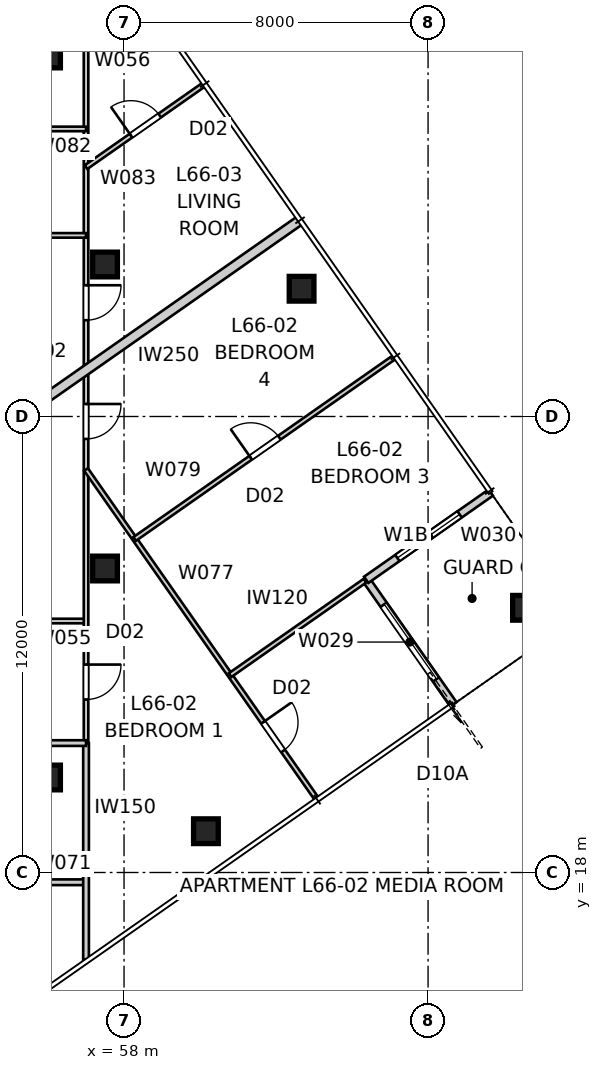
"""IFC4 building model, lengths in metres.
Left out: names, types, materials, properties, quantities, classifications, styles, units other than length and angle.
Written with IfcOpenShell. Run it as: python <this file> out.ifc"""

import sys

from ifc_helpers import new_model, si_unit, direction, frame, frame_2d, origin, origin_2d, place, context, subcontext, project, spatial, rectangle, extrude, element, fill, save


model = new_model("IFC4")
c1 = context("Model", 3, precision=1e-05, world=origin(), true_north=direction((0.0, 1.0)))
c2 = subcontext(c1, "Body", "Model", "MODEL_VIEW")
j1 = project(units=[si_unit("LENGTHUNIT", "METRE"), si_unit("PLANEANGLEUNIT", "RADIAN")], contexts=[c1])
p1 = place(None, origin())
s1 = spatial("IfcSite", under=j1, at=p1, CompositionType="ELEMENT")
p2 = place(p1, origin())
s2 = spatial("IfcBuilding", under=s1, at=p2, CompositionType="ELEMENT")
p3 = place(p2, frame((0.0, 0.0, 240.4)))
s3 = spatial("IfcBuildingStorey", under=s2, at=p3, CompositionType="ELEMENT", Elevation=240.4)
for number, where, z_axis, x_axis in (
    (1, (60.155, 19.086, -0.15), (0.0, 0.0, 1.0), (1.0, 0.0, 0.0)),
    (2, (68.551, 24.966, -0.15), (0.0, 0.0, 1.0), (1.0, 0.0, 0.0)),
    (3, (62.672, 33.362, -0.15), (0.0, 0.0, 1.0), (1.0, 0.0, 0.0)),
):
    element("IfcColumn", number, at=place(p3, frame(where, z_axis=z_axis, x_axis=x_axis)), inside=s3, PredefinedType="COLUMN", context=c2, shape_type="SweptSolid", body=[
        extrude(rectangle(XDim=0.65, YDim=0.65, at=origin_2d()), origin(), (0.0, 0.0, 1.0), 3.55),
    ])
for number, where, z_axis, x_axis in (
    (4, (57.5, 26.0, 0.0), (0.0, 0.0, 1.0), (1.0, 0.0, 0.0)),
    (5, (57.5, 34.0, 0.0), (0.0, 0.0, 1.0), (1.0, 0.0, 0.0)),
    (6, (56.0, 39.5, 0.0), (0.0, 0.0, 1.0), (1.0, 0.0, 0.0)),
    (7, (56.0, 20.5, 0.0), (0.0, 0.0, 1.0), (1.0, 0.0, 0.0)),
):
    element("IfcColumn", number, at=place(p3, frame(where, z_axis=z_axis, x_axis=x_axis)), inside=s3, PredefinedType="COLUMN", context=c2, shape_type="SweptSolid", body=[
        extrude(rectangle(XDim=0.65, YDim=0.65, at=origin_2d()), origin(), (0.0, 0.0, 1.0), 3.4),
    ])
p4 = place(p3, frame((66.667, 22.426, 0.0), z_axis=(0.0, 0.0, 1.0), x_axis=(-0.573556557423, 0.819165963305, 0.0)))
e8 = element("IfcWall", 8, at=p4, inside=s3, PredefinedType="SOLIDWALL", context=c2, shape_type="SweptSolid", body=[
    extrude(rectangle(XDim=4.0, YDim=0.2, at=frame_2d((2.0, 0.0))), origin(), (0.0, 0.0, 1.0), 3.25),
])
p5 = place(p4, frame((0.8, 0.0, 0.0)))
e9 = element("IfcOpeningElement", 9, at=p5, cuts=e8, PredefinedType="OPENING", context=c2, shape_type="SweptSolid", body=[
    extrude(rectangle(XDim=2.4, YDim=2.1, at=frame_2d((1.2, 1.05))), frame((0.0, 0.11, 0.0), z_axis=(0.0, -1.0, 0.0), x_axis=(1.0, 0.0, 0.0)), (0.0, 0.0, 1.0), 0.22),
])
p6 = place(p3, frame((64.373, 25.702, 0.0), z_axis=(0.0, 0.0, 1.0), x_axis=(0.819137286189, 0.573597512525, 0.0)))
e10 = element("IfcWall", 10, at=p6, inside=s3, PredefinedType="SOLIDWALL", context=c2, shape_type="SweptSolid", body=[
    extrude(rectangle(XDim=4.0, YDim=0.2, at=frame_2d((2.0, 0.0))), origin(), (0.0, 0.0, 1.0), 3.25),
])
p7 = place(p6, frame((1.0, 0.0, 0.45)))
e11 = element("IfcOpeningElement", 11, at=p7, cuts=e10, PredefinedType="OPENING", context=c2, shape_type="SweptSolid", body=[
    extrude(rectangle(XDim=2.0, YDim=1.8, at=frame_2d((1.0, 0.9))), frame((0.0, 0.11, 0.0), z_axis=(0.0, -1.0, 0.0), x_axis=(1.0, 0.0, 0.0)), (0.0, 0.0, 1.0), 0.22),
])
p8 = place(p3, frame((57.612, 42.332, 0.0), z_axis=(0.0, 0.0, 1.0), x_axis=(-0.819161528122, -0.573562891796, 0.0)))
e12 = element("IfcWall", 12, at=p8, inside=s3, PredefinedType="PARTITIONING", context=c2, shape_type="SweptSolid", body=[
    extrude(rectangle(XDim=6.681, YDim=0.25, at=frame_2d((3.341, 0.0))), origin(), (0.0, 0.0, 1.0), 3.25),
])
p9 = place(p3, frame((62.631, 35.164, 0.0), z_axis=(0.0, 0.0, 1.0), x_axis=(-0.81915902312, -0.573566469418, 0.0)))
e13 = element("IfcWall", 13, at=p9, inside=s3, PredefinedType="PARTITIONING", context=c2, shape_type="SweptSolid", body=[
    extrude(rectangle(XDim=9.756, YDim=0.25, at=frame_2d((4.878, 0.0))), origin(), (0.0, 0.0, 1.0), 3.25),
])
p10 = place(p3, frame((57.0, 24.618, 0.0), z_axis=(0.0, 0.0, 1.0), x_axis=(-1.0, 0.0, 0.0)))
e14 = element("IfcWall", 14, at=p10, inside=s3, PredefinedType="PARTITIONING", context=c2, shape_type="SweptSolid", body=[
    extrude(rectangle(XDim=4.9, YDim=0.12, at=frame_2d((2.45, 0.0))), origin(), (0.0, 0.0, 1.0), 3.25),
])
p11 = place(p10, frame((1.99, 0.0, 0.0)))
e15 = element("IfcOpeningElement", 15, at=p11, cuts=e14, PredefinedType="OPENING", context=c2, shape_type="SweptSolid", body=[
    extrude(rectangle(XDim=0.92, YDim=2.34, at=frame_2d((0.46, 1.17))), frame((0.0, 0.07, 0.0), z_axis=(0.0, -1.0, 0.0), x_axis=(1.0, 0.0, 0.0)), (0.0, 0.0, 1.0), 0.14),
])
p12 = place(p3, frame((57.0, 41.904, 0.0), z_axis=(0.0, 0.0, 1.0), x_axis=(0.0, -1.0, 0.0)))
e16 = element("IfcWall", 16, at=p12, inside=s3, PredefinedType="PARTITIONING", context=c2, shape_type="SweptSolid", body=[
    extrude(rectangle(XDim=20.498, YDim=0.12, at=frame_2d((10.249, 0.0))), origin(), (0.0, 0.0, 1.0), 2.55),
])
p13 = place(p12, frame((8.449, 0.0, 0.0)))
e17 = element("IfcOpeningElement", 17, at=p13, cuts=e16, PredefinedType="OPENING", context=c2, shape_type="SweptSolid", body=[
    extrude(rectangle(XDim=0.92, YDim=2.34, at=frame_2d((0.46, 1.17))), frame((0.0, 0.07, 0.0), z_axis=(0.0, -1.0, 0.0), x_axis=(1.0, 0.0, 0.0)), (0.0, 0.0, 1.0), 0.14),
])
p14 = place(p12, frame((11.574, 0.0, 0.0)))
e18 = element("IfcOpeningElement", 18, at=p14, cuts=e16, PredefinedType="OPENING", context=c2, shape_type="SweptSolid", body=[
    extrude(rectangle(XDim=0.92, YDim=2.34, at=frame_2d((0.46, 1.17))), frame((0.0, 0.07, 0.0), z_axis=(0.0, -1.0, 0.0), x_axis=(1.0, 0.0, 0.0)), (0.0, 0.0, 1.0), 0.14),
])
p15 = place(p12, frame((18.432, 0.0, 0.0)))
e19 = element("IfcOpeningElement", 19, at=p15, cuts=e16, PredefinedType="OPENING", context=c2, shape_type="SweptSolid", body=[
    extrude(rectangle(XDim=0.92, YDim=2.34, at=frame_2d((0.46, 1.17))), frame((0.0, 0.07, 0.0), z_axis=(0.0, -1.0, 0.0), x_axis=(1.0, 0.0, 0.0)), (0.0, 0.0, 1.0), 0.14),
])
p16 = place(p3, frame((52.109, 17.743, 0.0), z_axis=(0.0, 0.0, 1.0), x_axis=(1.0, 0.0, 0.0)))
e20 = element("IfcWall", 20, at=p16, inside=s3, PredefinedType="SOLIDWALL", context=c2, shape_type="SweptSolid", body=[
    extrude(rectangle(XDim=4.891, YDim=0.15, at=frame_2d((2.446, 0.0))), origin(), (0.0, 0.0, 1.0), 3.25),
])
p17 = place(p16, frame((1.986, 0.0, 0.0)))
e21 = element("IfcOpeningElement", 21, at=p17, cuts=e20, PredefinedType="OPENING", context=c2, shape_type="SweptSolid", body=[
    extrude(rectangle(XDim=0.92, YDim=2.34, at=frame_2d((0.46, 1.17))), frame((0.0, 0.085, 0.0), z_axis=(0.0, -1.0, 0.0), x_axis=(1.0, 0.0, 0.0)), (0.0, 0.0, 1.0), 0.17),
])
p18 = place(p3, frame((57.0, 21.406, 0.0), z_axis=(0.0, 0.0, 1.0), x_axis=(0.0, -1.0, 0.0)))
e22 = element("IfcWall", 22, at=p18, inside=s3, PredefinedType="SOLIDWALL", context=c2, shape_type="SweptSolid", body=[
    extrude(rectangle(XDim=5.7, YDim=0.15, at=frame_2d((2.85, 0.0))), origin(), (0.0, 0.0, 1.0), 3.25),
])
p19 = place(p3, frame((57.0, 21.406, 0.0), z_axis=(0.0, 0.0, 1.0), x_axis=(-1.0, 0.0, 0.0)))
e23 = element("IfcWall", 23, at=p19, inside=s3, PredefinedType="SOLIDWALL", context=c2, shape_type="SweptSolid", body=[
    extrude(rectangle(XDim=4.9, YDim=0.15, at=frame_2d((2.45, 0.0))), origin(), (0.0, 0.0, 1.0), 3.25),
])
p20 = place(p19, frame((1.99, 0.0, 0.0)))
e24 = element("IfcOpeningElement", 24, at=p20, cuts=e23, PredefinedType="OPENING", context=c2, shape_type="SweptSolid", body=[
    extrude(rectangle(XDim=0.92, YDim=2.34, at=frame_2d((0.46, 1.17))), frame((0.0, 0.085, 0.0), z_axis=(0.0, -1.0, 0.0), x_axis=(1.0, 0.0, 0.0)), (0.0, 0.0, 1.0), 0.17),
])
p21 = place(p3, frame((57.0, 28.604, 0.0), z_axis=(0.0, 0.0, 1.0), x_axis=(0.573575545802, -0.819152667857, 0.0)))
e25 = element("IfcWall", 25, at=p21, inside=s3, PredefinedType="PARTITIONING", context=c2, shape_type="SweptSolid", body=[
    extrude(rectangle(XDim=10.566, YDim=0.12, at=frame_2d((5.283, 0.0))), origin(), (0.0, 0.0, 1.0), 3.25),
])
p22 = place(p21, frame((8.121, 0.0, 0.0)))
e26 = element("IfcOpeningElement", 26, at=p22, cuts=e25, PredefinedType="OPENING", context=c2, shape_type="SweptSolid", body=[
    extrude(rectangle(XDim=0.92, YDim=2.34, at=frame_2d((0.46, 1.17))), frame((0.0, 0.07, 0.0), z_axis=(0.0, -1.0, 0.0), x_axis=(1.0, 0.0, 0.0)), (0.0, 0.0, 1.0), 0.14),
])
p23 = place(p3, frame((58.28, 26.777, 0.0), z_axis=(0.0, 0.0, 1.0), x_axis=(0.819152099525, 0.573576357466, 0.0)))
e27 = element("IfcWall", 27, at=p23, inside=s3, PredefinedType="PARTITIONING", context=c2, shape_type="SweptSolid", body=[
    extrude(rectangle(XDim=8.335, YDim=0.12, at=frame_2d((4.167, 0.0))), origin(), (0.0, 0.0, 1.0), 3.25),
])
p24 = place(p23, frame((3.728, 0.0, 0.0)))
e28 = element("IfcOpeningElement", 28, at=p24, cuts=e27, PredefinedType="OPENING", context=c2, shape_type="SweptSolid", body=[
    extrude(rectangle(XDim=0.92, YDim=2.34, at=frame_2d((0.46, 1.17))), frame((0.0, 0.07, 0.0), z_axis=(0.0, -1.0, 0.0), x_axis=(1.0, 0.0, 0.0)), (0.0, 0.0, 1.0), 0.14),
])
p25 = place(p3, frame((64.34, 25.679, 0.0), z_axis=(0.0, 0.0, 1.0), x_axis=(-0.819165768115, -0.573556836197, 0.0)))
e29 = element("IfcWall", 29, at=p25, inside=s3, PredefinedType="PARTITIONING", context=c2, shape_type="SweptSolid", body=[
    extrude(rectangle(XDim=4.335, YDim=0.12, at=frame_2d((2.167, 0.0))), origin(), (0.0, 0.0, 1.0), 3.25),
])
p26 = place(p3, frame((52.1, 34.766, 0.0), z_axis=(0.0, 0.0, 1.0), x_axis=(1.0, 0.0, 0.0)))
e30 = element("IfcWall", 30, at=p26, inside=s3, PredefinedType="PARTITIONING", context=c2, shape_type="SweptSolid", body=[
    extrude(rectangle(XDim=4.9, YDim=0.12, at=frame_2d((2.45, 0.0))), origin(), (0.0, 0.0, 1.0), 3.25),
])
p27 = place(p26, frame((2.59, 0.0, 0.0)))
e31 = element("IfcOpeningElement", 31, at=p27, cuts=e30, PredefinedType="OPENING", context=c2, shape_type="SweptSolid", body=[
    extrude(rectangle(XDim=0.92, YDim=2.34, at=frame_2d((0.46, 1.17))), frame((0.0, 0.07, 0.0), z_axis=(0.0, -1.0, 0.0), x_axis=(1.0, 0.0, 0.0)), (0.0, 0.0, 1.0), 0.14),
])
p28 = place(p3, frame((57.0, 37.568, 0.0), z_axis=(0.0, 0.0, 1.0), x_axis=(-1.0, 0.0, 0.0)))
e32 = element("IfcWall", 32, at=p28, inside=s3, PredefinedType="PARTITIONING", context=c2, shape_type="SweptSolid", body=[
    extrude(rectangle(XDim=4.9, YDim=0.12, at=frame_2d((2.45, 0.0))), origin(), (0.0, 0.0, 1.0), 3.25),
])
p29 = place(p28, frame((1.97, 0.0, 0.0)))
e33 = element("IfcOpeningElement", 33, at=p29, cuts=e32, PredefinedType="OPENING", context=c2, shape_type="SweptSolid", body=[
    extrude(rectangle(XDim=0.96, YDim=2.1, at=frame_2d((0.48, 1.05))), frame((0.0, 0.07, 0.0), z_axis=(0.0, -1.0, 0.0), x_axis=(1.0, 0.0, 0.0)), (0.0, 0.0, 1.0), 0.14),
])
p30 = place(p3, frame((57.0, 36.562, 0.0), z_axis=(0.0, 0.0, 1.0), x_axis=(0.819140645834, 0.573592714688, 0.0)))
e34 = element("IfcWall", 34, at=p30, inside=s3, PredefinedType="PARTITIONING", context=c2, shape_type="SweptSolid", body=[
    extrude(rectangle(XDim=3.77, YDim=0.12, at=frame_2d((1.885, 0.0))), origin(), (0.0, 0.0, 1.0), 3.25),
])
p31 = place(p30, frame((1.445, 0.0, 0.0)))
e35 = element("IfcOpeningElement", 35, at=p31, cuts=e34, PredefinedType="OPENING", context=c2, shape_type="SweptSolid", body=[
    extrude(rectangle(XDim=0.92, YDim=2.34, at=frame_2d((0.46, 1.17))), frame((0.0, 0.07, 0.0), z_axis=(0.0, -1.0, 0.0), x_axis=(1.0, 0.0, 0.0)), (0.0, 0.0, 1.0), 0.14),
])
p32 = place(p5, origin())
e36 = element("IfcDoor", 36, at=p32, inside=s3, OperationType="SLIDING_TO_LEFT", PredefinedType="DOOR", context=c2, shape_type="SweptSolid", body=[
    extrude(rectangle(XDim=2.4, YDim=2.1, at=frame_2d((1.2, 1.05))), frame((0.0, 0.025, 0.0), z_axis=(0.0, -1.0, 0.0), x_axis=(1.0, 0.0, 0.0)), (0.0, 0.0, 1.0), 0.05),
])
fill(e9, e36)
p33 = place(p7, origin())
e37 = element("IfcWindow", 37, at=p33, inside=s3, PartitioningType="SINGLE_PANEL", PredefinedType="WINDOW", context=c2, shape_type="SweptSolid", body=[
    extrude(rectangle(XDim=2.0, YDim=1.8, at=frame_2d((1.0, 0.9))), frame((0.0, 0.03, 0.0), z_axis=(0.0, -1.0, 0.0), x_axis=(1.0, 0.0, 0.0)), (0.0, 0.0, 1.0), 0.06),
])
fill(e11, e37)
p34 = place(p13, origin())
e38 = element("IfcDoor", 38, at=p34, inside=s3, OperationType="SINGLE_SWING_LEFT", PredefinedType="DOOR", context=c2, shape_type="SweptSolid", body=[
    extrude(rectangle(XDim=0.92, YDim=2.34, at=frame_2d((0.46, 1.17))), frame((0.0, 0.025, 0.0), z_axis=(0.0, -1.0, 0.0), x_axis=(1.0, 0.0, 0.0)), (0.0, 0.0, 1.0), 0.05),
])
fill(e17, e38)
p35 = place(p14, origin())
e39 = element("IfcDoor", 39, at=p35, inside=s3, OperationType="SINGLE_SWING_LEFT", PredefinedType="DOOR", context=c2, shape_type="SweptSolid", body=[
    extrude(rectangle(XDim=0.92, YDim=2.34, at=frame_2d((0.46, 1.17))), frame((0.0, 0.025, 0.0), z_axis=(0.0, -1.0, 0.0), x_axis=(1.0, 0.0, 0.0)), (0.0, 0.0, 1.0), 0.05),
])
fill(e18, e39)
p36 = place(p31, origin())
e40 = element("IfcDoor", 40, at=p36, inside=s3, OperationType="SINGLE_SWING_LEFT", PredefinedType="DOOR", context=c2, shape_type="SweptSolid", body=[
    extrude(rectangle(XDim=0.92, YDim=2.34, at=frame_2d((0.46, 1.17))), frame((0.0, 0.025, 0.0), z_axis=(0.0, -1.0, 0.0), x_axis=(1.0, 0.0, 0.0)), (0.0, 0.0, 1.0), 0.05),
])
fill(e35, e40)
p37 = place(p15, origin())
e41 = element("IfcDoor", 41, at=p37, inside=s3, OperationType="SINGLE_SWING_LEFT", PredefinedType="DOOR", context=c2, shape_type="SweptSolid", body=[
    extrude(rectangle(XDim=0.92, YDim=2.34, at=frame_2d((0.46, 1.17))), frame((0.0, 0.025, 0.0), z_axis=(0.0, -1.0, 0.0), x_axis=(1.0, 0.0, 0.0)), (0.0, 0.0, 1.0), 0.05),
])
fill(e19, e41)
p38 = place(p24, origin())
e42 = element("IfcDoor", 42, at=p38, inside=s3, OperationType="SINGLE_SWING_LEFT", PredefinedType="DOOR", context=c2, shape_type="SweptSolid", body=[
    extrude(rectangle(XDim=0.92, YDim=2.34, at=frame_2d((0.46, 1.17))), frame((0.0, 0.025, 0.0), z_axis=(0.0, -1.0, 0.0), x_axis=(1.0, 0.0, 0.0)), (0.0, 0.0, 1.0), 0.05),
])
fill(e28, e42)
p39 = place(p22, origin())
e43 = element("IfcDoor", 43, at=p39, inside=s3, OperationType="SINGLE_SWING_LEFT", PredefinedType="DOOR", context=c2, shape_type="SweptSolid", body=[
    extrude(rectangle(XDim=0.92, YDim=2.34, at=frame_2d((0.46, 1.17))), frame((0.0, 0.025, 0.0), z_axis=(0.0, -1.0, 0.0), x_axis=(1.0, 0.0, 0.0)), (0.0, 0.0, 1.0), 0.05),
])
fill(e26, e43)
save(model, sys.argv[1])
